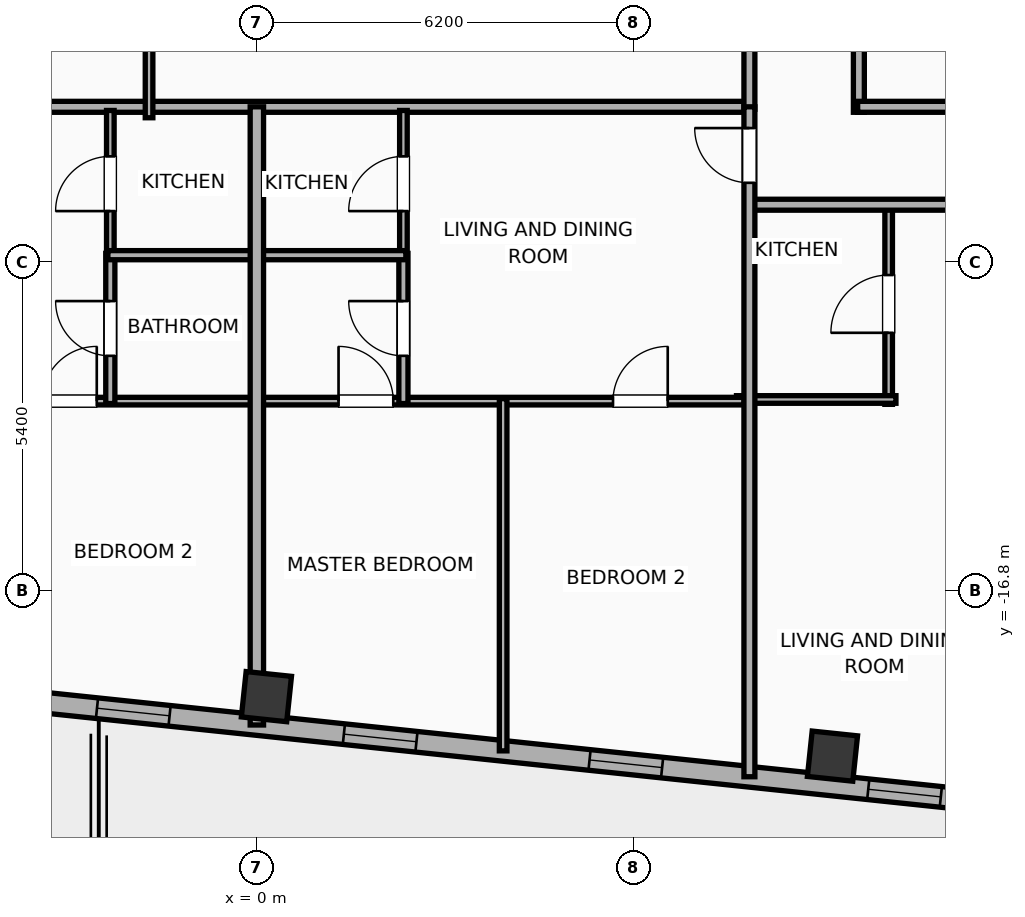
"""IFC4 building model, lengths in metres.
Left out: names, types, materials, properties, quantities, classifications, styles, units other than length and angle.
Written with IfcOpenShell. Run it as: python <this file> out.ifc"""

import sys

from ifc_helpers import new_model, si_unit, direction, frame, frame_2d, origin, origin_2d, place, context, subcontext, project, spatial, rectangle, hollow_rectangle, extrude, element, fill, save


model = new_model("IFC4")
c1 = context("Model", 3, precision=1e-05, world=origin(), true_north=direction((0.0, 1.0)))
c2 = subcontext(c1, "Body", "Model", "MODEL_VIEW")
j1 = project(units=[si_unit("LENGTHUNIT", "METRE"), si_unit("PLANEANGLEUNIT", "RADIAN")], contexts=[c1])
p1 = place(None, origin())
s1 = spatial("IfcSite", under=j1, at=p1, CompositionType="ELEMENT")
p2 = place(p1, origin())
s2 = spatial("IfcBuilding", under=s1, at=p2, CompositionType="ELEMENT")
p3 = place(p2, frame((0.0, 0.0, 291.2)))
s3 = spatial("IfcBuildingStorey", under=s2, at=p3, CompositionType="ELEMENT", Elevation=291.2)
for number, where, z_axis, x_axis in (
    (1, (0.157, -18.54, 0.0), (0.0, 0.0, 1.0), (0.995, -0.105, 0.0)),
    (2, (9.466, -19.518, 0.0), (0.0, 0.0, 1.0), (0.995, -0.105, 0.0)),
):
    element("IfcColumn", number, at=place(p3, frame(where, z_axis=z_axis, x_axis=x_axis)), inside=s3, PredefinedType="COLUMN", context=c2, shape_type="SweptSolid", body=[
        extrude(hollow_rectangle(XDim=0.75, YDim=0.75, WallThickness=0.025, at=origin_2d()), origin(), (0.0, 0.0, 1.0), 3.9),
    ])
p4 = place(p3, frame((18.708, -20.972, 0.0), z_axis=(0.0, 0.0, 1.0), x_axis=(-0.994521888554, 0.104528528102, 0.0)))
e3 = element("IfcWall", 3, at=p4, inside=s3, PredefinedType="ELEMENTEDWALL", context=c2, shape_type="SweptSolid", body=[
    extrude(rectangle(XDim=46.766, YDim=0.34, at=frame_2d((23.383, 0.0))), origin(), (0.0, 0.0, 1.0), 3.635),
])
p5 = place(p4, frame((23.733, 0.0, 0.65)))
e4 = element("IfcOpeningElement", 4, at=p5, cuts=e3, PredefinedType="OPENING", context=c2, shape_type="SweptSolid", body=[
    extrude(rectangle(XDim=2.6, YDim=2.45, at=frame_2d((1.3, 1.225))), frame((0.0, 0.18, 0.0), z_axis=(0.0, -1.0, 0.0), x_axis=(1.0, 0.0, 0.0)), (0.0, 0.0, 1.0), 0.36),
])
p6 = place(p4, frame((44.402, 0.0, 0.75)))
e5 = element("IfcOpeningElement", 5, at=p6, cuts=e3, PredefinedType="OPENING", context=c2, shape_type="SweptSolid", body=[
    extrude(rectangle(XDim=1.2, YDim=2.05, at=frame_2d((0.6, 1.025))), frame((0.0, 0.18, 0.0), z_axis=(0.0, -1.0, 0.0), x_axis=(1.0, 0.0, 0.0)), (0.0, 0.0, 1.0), 0.36),
])
p7 = place(p4, frame((39.54, 0.0, 0.75)))
e6 = element("IfcOpeningElement", 6, at=p7, cuts=e3, PredefinedType="OPENING", context=c2, shape_type="SweptSolid", body=[
    extrude(rectangle(XDim=1.2, YDim=2.05, at=frame_2d((0.6, 1.025))), frame((0.0, 0.18, 0.0), z_axis=(0.0, -1.0, 0.0), x_axis=(1.0, 0.0, 0.0)), (0.0, 0.0, 1.0), 0.36),
])
p8 = place(p4, frame((42.406, 0.0, 0.75)))
e7 = element("IfcOpeningElement", 7, at=p8, cuts=e3, PredefinedType="OPENING", context=c2, shape_type="SweptSolid", body=[
    extrude(rectangle(XDim=1.2, YDim=2.05, at=frame_2d((0.6, 1.025))), frame((0.0, 0.18, 0.0), z_axis=(0.0, -1.0, 0.0), x_axis=(1.0, 0.0, 0.0)), (0.0, 0.0, 1.0), 0.36),
])
p9 = place(p4, frame((34.933, 0.0, 0.75)))
e8 = element("IfcOpeningElement", 8, at=p9, cuts=e3, PredefinedType="OPENING", context=c2, shape_type="SweptSolid", body=[
    extrude(rectangle(XDim=1.2, YDim=2.05, at=frame_2d((0.6, 1.025))), frame((0.0, 0.18, 0.0), z_axis=(0.0, -1.0, 0.0), x_axis=(1.0, 0.0, 0.0)), (0.0, 0.0, 1.0), 0.36),
])
p10 = place(p4, frame((28.631, 0.0, 0.75)))
e9 = element("IfcOpeningElement", 9, at=p10, cuts=e3, PredefinedType="OPENING", context=c2, shape_type="SweptSolid", body=[
    extrude(rectangle(XDim=1.2, YDim=2.05, at=frame_2d((0.6, 1.025))), frame((0.0, 0.18, 0.0), z_axis=(0.0, -1.0, 0.0), x_axis=(1.0, 0.0, 0.0)), (0.0, 0.0, 1.0), 0.36),
])
p11 = place(p4, frame((30.896, 0.0, 0.75)))
e10 = element("IfcOpeningElement", 10, at=p11, cuts=e3, PredefinedType="OPENING", context=c2, shape_type="SweptSolid", body=[
    extrude(rectangle(XDim=1.2, YDim=2.05, at=frame_2d((0.6, 1.025))), frame((0.0, 0.18, 0.0), z_axis=(0.0, -1.0, 0.0), x_axis=(1.0, 0.0, 0.0)), (0.0, 0.0, 1.0), 0.36),
])
p12 = place(p4, frame((7.501, 0.0, 0.75)))
e11 = element("IfcOpeningElement", 11, at=p12, cuts=e3, PredefinedType="OPENING", context=c2, shape_type="SweptSolid", body=[
    extrude(rectangle(XDim=1.2, YDim=2.05, at=frame_2d((0.6, 1.025))), frame((0.0, 0.18, 0.0), z_axis=(0.0, -1.0, 0.0), x_axis=(1.0, 0.0, 0.0)), (0.0, 0.0, 1.0), 0.36),
])
p13 = place(p4, frame((4.159, 0.0, 0.75)))
e12 = element("IfcOpeningElement", 12, at=p13, cuts=e3, PredefinedType="OPENING", context=c2, shape_type="SweptSolid", body=[
    extrude(rectangle(XDim=1.2, YDim=2.05, at=frame_2d((0.6, 1.025))), frame((0.0, 0.18, 0.0), z_axis=(0.0, -1.0, 0.0), x_axis=(1.0, 0.0, 0.0)), (0.0, 0.0, 1.0), 0.36),
])
p14 = place(p4, frame((1.369, 0.0, 0.75)))
e13 = element("IfcOpeningElement", 13, at=p14, cuts=e3, PredefinedType="OPENING", context=c2, shape_type="SweptSolid", body=[
    extrude(rectangle(XDim=1.2, YDim=2.05, at=frame_2d((0.6, 1.025))), frame((0.0, 0.18, 0.0), z_axis=(0.0, -1.0, 0.0), x_axis=(1.0, 0.0, 0.0)), (0.0, 0.0, 1.0), 0.36),
])
p15 = place(p4, frame((20.254, 0.0, 0.75)))
e14 = element("IfcOpeningElement", 14, at=p15, cuts=e3, PredefinedType="OPENING", context=c2, shape_type="SweptSolid", body=[
    extrude(rectangle(XDim=1.2, YDim=2.05, at=frame_2d((0.6, 1.025))), frame((0.0, 0.18, 0.0), z_axis=(0.0, -1.0, 0.0), x_axis=(1.0, 0.0, 0.0)), (0.0, 0.0, 1.0), 0.36),
])
p16 = place(p4, frame((16.172, 0.0, 0.75)))
e15 = element("IfcOpeningElement", 15, at=p16, cuts=e3, PredefinedType="OPENING", context=c2, shape_type="SweptSolid", body=[
    extrude(rectangle(XDim=1.2, YDim=2.05, at=frame_2d((0.6, 1.025))), frame((0.0, 0.18, 0.0), z_axis=(0.0, -1.0, 0.0), x_axis=(1.0, 0.0, 0.0)), (0.0, 0.0, 1.0), 0.36),
])
p17 = place(p4, frame((12.11, 0.0, 0.75)))
e16 = element("IfcOpeningElement", 16, at=p17, cuts=e3, PredefinedType="OPENING", context=c2, shape_type="SweptSolid", body=[
    extrude(rectangle(XDim=1.2, YDim=2.05, at=frame_2d((0.6, 1.025))), frame((0.0, 0.18, 0.0), z_axis=(0.0, -1.0, 0.0), x_axis=(1.0, 0.0, 0.0)), (0.0, 0.0, 1.0), 0.36),
])
p18 = place(p3, frame((9.9, -8.93, 0.0), z_axis=(0.0, 0.0, 1.0), x_axis=(0.0, 1.0, 0.0)))
e17 = element("IfcWall", 17, at=p18, inside=s3, PredefinedType="PARTITIONING", context=c2, shape_type="SweptSolid", body=[
    extrude(rectangle(XDim=17.86, YDim=0.18, at=frame_2d((8.93, 0.0))), origin(), (0.0, 0.0, 1.0), 3.635),
])
p19 = place(p18, frame((7.487, 0.0, 0.0)))
e18 = element("IfcOpeningElement", 18, at=p19, cuts=e17, PredefinedType="OPENING", context=c2, shape_type="SweptSolid", body=[
    extrude(rectangle(XDim=1.1, YDim=2.05, at=frame_2d((0.55, 1.025))), frame((0.0, 0.1, 0.0), z_axis=(0.0, -1.0, 0.0), x_axis=(1.0, 0.0, 0.0)), (0.0, 0.0, 1.0), 0.2),
])
p20 = place(p3, frame((9.88, -8.84, 0.0), z_axis=(0.0, 0.0, 1.0), x_axis=(1.0, 0.0, 0.0)))
e19 = element("IfcWall", 19, at=p20, inside=s3, PredefinedType="PARTITIONING", context=c2, shape_type="SweptSolid", body=[
    extrude(rectangle(XDim=13.569, YDim=0.18, at=frame_2d((6.784, 0.0))), origin(), (0.0, 0.0, 1.0), 3.635),
])
p21 = place(p3, frame((-8.15, -8.84, 0.0), z_axis=(0.0, 0.0, 1.0), x_axis=(1.0, 0.0, 0.0)))
e20 = element("IfcWall", 20, at=p21, inside=s3, PredefinedType="PARTITIONING", context=c2, shape_type="SweptSolid", body=[
    extrude(rectangle(XDim=16.3, YDim=0.18, at=frame_2d((8.15, 0.0))), origin(), (0.0, 0.0, 1.0), 3.635),
])
p22 = place(p3, frame((8.1, -8.88, 0.0), z_axis=(0.0, 0.0, 1.0), x_axis=(0.0, 1.0, 0.0)))
e21 = element("IfcWall", 21, at=p22, inside=s3, PredefinedType="PARTITIONING", context=c2, shape_type="SweptSolid", body=[
    extrude(rectangle(XDim=17.76, YDim=0.18, at=frame_2d((8.88, 0.0))), origin(), (0.0, 0.0, 1.0), 3.635),
])
p23 = place(p3, frame((-1.773, -9.02, 0.0), z_axis=(0.0, 0.0, 1.0), x_axis=(0.0, 1.0, 0.0)))
e22 = element("IfcWall", 22, at=p23, inside=s3, PredefinedType="PARTITIONING", context=c2, shape_type="SweptSolid", body=[
    extrude(rectangle(XDim=17.99, YDim=0.125, at=frame_2d((8.995, 0.0))), origin(), (0.0, 0.0, 1.0), 3.635),
])
p24 = place(p23, frame((8.52, 0.0, 0.0)))
e23 = element("IfcOpeningElement", 23, at=p24, cuts=e22, PredefinedType="OPENING", context=c2, shape_type="SweptSolid", body=[
    extrude(rectangle(XDim=0.95, YDim=2.05, at=frame_2d((0.475, 1.025))), frame((0.0, 0.073, 0.0), z_axis=(0.0, -1.0, 0.0), x_axis=(1.0, 0.0, 0.0)), (0.0, 0.0, 1.0), 0.145),
])
p25 = place(p3, frame((10.39, -13.733, 0.0), z_axis=(0.0, 0.0, 1.0), x_axis=(0.0, 1.0, 0.0)))
e24 = element("IfcWall", 24, at=p25, inside=s3, PredefinedType="PARTITIONING", context=c2, shape_type="SweptSolid", body=[
    extrude(rectangle(XDim=3.303, YDim=0.125, at=frame_2d((1.651, 0.0))), origin(), (0.0, 0.0, 1.0), 3.635),
])
p26 = place(p25, frame((1.177, 0.0, 0.0)))
e25 = element("IfcOpeningElement", 25, at=p26, cuts=e24, PredefinedType="OPENING", context=c2, shape_type="SweptSolid", body=[
    extrude(rectangle(XDim=0.95, YDim=2.05, at=frame_2d((0.475, 1.025))), frame((0.0, 0.073, 0.0), z_axis=(0.0, -1.0, 0.0), x_axis=(1.0, 0.0, 0.0)), (0.0, 0.0, 1.0), 0.145),
])
p27 = place(p3, frame((7.887, -13.653, 0.0), z_axis=(0.0, 0.0, 1.0), x_axis=(1.0, 0.0, 0.0)))
e26 = element("IfcWall", 26, at=p27, inside=s3, PredefinedType="PARTITIONING", context=c2, shape_type="SweptSolid", body=[
    extrude(rectangle(XDim=2.623, YDim=0.125, at=frame_2d((1.311, 0.0))), origin(), (0.0, 0.0, 1.0), 3.635),
])
p28 = place(p3, frame((8.08, -10.45, 0.0), z_axis=(0.0, 0.0, 1.0), x_axis=(1.0, 0.0, 0.0)))
e27 = element("IfcWall", 27, at=p28, inside=s3, PredefinedType="PARTITIONING", context=c2, shape_type="SweptSolid", body=[
    extrude(rectangle(XDim=15.199, YDim=0.18, at=frame_2d((7.6, 0.0))), origin(), (0.0, 0.0, 1.0), 3.635),
])
p29 = place(p28, frame((3.39, 0.0, 0.0)))
e28 = element("IfcOpeningElement", 28, at=p29, cuts=e27, PredefinedType="OPENING", context=c2, shape_type="SweptSolid", body=[
    extrude(rectangle(XDim=1.15, YDim=2.05, at=frame_2d((0.575, 1.025))), frame((0.0, 0.1, 0.0), z_axis=(0.0, -1.0, 0.0), x_axis=(1.0, 0.0, 0.0)), (0.0, 0.0, 1.0), 0.2),
])
p30 = place(p28, frame((11.134, 0.0, 0.0)))
e29 = element("IfcOpeningElement", 29, at=p30, cuts=e27, PredefinedType="OPENING", context=c2, shape_type="SweptSolid", body=[
    extrude(rectangle(XDim=0.9, YDim=2.05, at=frame_2d((0.45, 1.025))), frame((0.0, 0.1, 0.0), z_axis=(0.0, -1.0, 0.0), x_axis=(1.0, 0.0, 0.0)), (0.0, 0.0, 1.0), 0.2),
])
p31 = place(p3, frame((-8.08, -13.68, 0.0), z_axis=(0.0, 0.0, 1.0), x_axis=(1.0, 0.0, 0.0)))
e30 = element("IfcWall", 30, at=p31, inside=s3, PredefinedType="PARTITIONING", context=c2, shape_type="SweptSolid", body=[
    extrude(rectangle(XDim=8.06, YDim=0.125, at=frame_2d((4.03, 0.0))), origin(), (0.0, 0.0, 1.0), 3.635),
])
p32 = place(p31, frame((1.323, 0.0, 0.0)))
e31 = element("IfcOpeningElement", 31, at=p32, cuts=e30, PredefinedType="OPENING", context=c2, shape_type="SweptSolid", body=[
    extrude(rectangle(XDim=0.9, YDim=2.05, at=frame_2d((0.45, 1.025))), frame((0.0, 0.073, 0.0), z_axis=(0.0, -1.0, 0.0), x_axis=(1.0, 0.0, 0.0)), (0.0, 0.0, 1.0), 0.145),
])
p33 = place(p31, frame((4.547, 0.0, 0.0)))
e32 = element("IfcOpeningElement", 32, at=p33, cuts=e30, PredefinedType="OPENING", context=c2, shape_type="SweptSolid", body=[
    extrude(rectangle(XDim=0.9, YDim=2.05, at=frame_2d((0.45, 1.025))), frame((0.0, 0.073, 0.0), z_axis=(0.0, -1.0, 0.0), x_axis=(1.0, 0.0, 0.0)), (0.0, 0.0, 1.0), 0.145),
])
p34 = place(p3, frame((-2.41, -11.31, 0.0), z_axis=(0.0, 0.0, 1.0), x_axis=(0.0, 1.0, 0.0)))
e33 = element("IfcWall", 33, at=p34, inside=s3, PredefinedType="PARTITIONING", context=c2, shape_type="SweptSolid", body=[
    extrude(rectangle(XDim=2.41, YDim=0.125, at=frame_2d((1.205, 0.0))), origin(), (0.0, 0.0, 1.0), 3.635),
])
p35 = place(p34, frame((0.755, 0.0, 0.0)))
e34 = element("IfcOpeningElement", 34, at=p35, cuts=e33, PredefinedType="OPENING", context=c2, shape_type="SweptSolid", body=[
    extrude(rectangle(XDim=0.9, YDim=2.05, at=frame_2d((0.45, 1.025))), frame((0.0, 0.073, 0.0), z_axis=(0.0, -1.0, 0.0), x_axis=(1.0, 0.0, 0.0)), (0.0, 0.0, 1.0), 0.145),
])
p36 = place(p3, frame((-2.41, -13.72, 0.0), z_axis=(0.0, 0.0, 1.0), x_axis=(0.0, 1.0, 0.0)))
e35 = element("IfcWall", 35, at=p36, inside=s3, PredefinedType="PLUMBINGWALL", context=c2, shape_type="SweptSolid", body=[
    extrude(rectangle(XDim=2.47, YDim=0.15, at=frame_2d((1.235, 0.0))), origin(), (0.0, 0.0, 1.0), 3.635),
])
p37 = place(p36, frame((0.785, 0.0, 0.0)))
e36 = element("IfcOpeningElement", 36, at=p37, cuts=e35, PredefinedType="OPENING", context=c2, shape_type="SweptSolid", body=[
    extrude(rectangle(XDim=0.9, YDim=2.05, at=frame_2d((0.45, 1.025))), frame((0.0, 0.085, 0.0), z_axis=(0.0, -1.0, 0.0), x_axis=(1.0, 0.0, 0.0)), (0.0, 0.0, 1.0), 0.17),
])
p38 = place(p3, frame((-2.45, -11.28, 0.0), z_axis=(0.0, 0.0, 1.0), x_axis=(1.0, 0.0, 0.0)))
e37 = element("IfcWall", 37, at=p38, inside=s3, PredefinedType="PLUMBINGWALL", context=c2, shape_type="SweptSolid", body=[
    extrude(rectangle(XDim=2.43, YDim=0.15, at=frame_2d((1.215, 0.0))), origin(), (0.0, 0.0, 1.0), 3.635),
])
p39 = place(p3, frame((0.02, -13.68, 0.0), z_axis=(0.0, 0.0, 1.0), x_axis=(1.0, 0.0, 0.0)))
e38 = element("IfcWall", 38, at=p39, inside=s3, PredefinedType="PARTITIONING", context=c2, shape_type="SweptSolid", body=[
    extrude(rectangle(XDim=7.992, YDim=0.125, at=frame_2d((3.996, 0.0))), origin(), (0.0, 0.0, 1.0), 3.635),
])
p40 = place(p39, frame((1.323, 0.0, 0.0)))
e39 = element("IfcOpeningElement", 39, at=p40, cuts=e38, PredefinedType="OPENING", context=c2, shape_type="SweptSolid", body=[
    extrude(rectangle(XDim=0.9, YDim=2.05, at=frame_2d((0.45, 1.025))), frame((0.0, 0.073, 0.0), z_axis=(0.0, -1.0, 0.0), x_axis=(1.0, 0.0, 0.0)), (0.0, 0.0, 1.0), 0.145),
])
p41 = place(p39, frame((5.837, 0.0, 0.0)))
e40 = element("IfcOpeningElement", 40, at=p41, cuts=e38, PredefinedType="OPENING", context=c2, shape_type="SweptSolid", body=[
    extrude(rectangle(XDim=0.9, YDim=2.05, at=frame_2d((0.45, 1.025))), frame((0.0, 0.073, 0.0), z_axis=(0.0, -1.0, 0.0), x_axis=(1.0, 0.0, 0.0)), (0.0, 0.0, 1.0), 0.145),
])
p42 = place(p3, frame((2.41, -11.31, 0.0), z_axis=(0.0, 0.0, 1.0), x_axis=(0.0, 1.0, 0.0)))
e41 = element("IfcWall", 41, at=p42, inside=s3, PredefinedType="PARTITIONING", context=c2, shape_type="SweptSolid", body=[
    extrude(rectangle(XDim=2.41, YDim=0.125, at=frame_2d((1.205, 0.0))), origin(), (0.0, 0.0, 1.0), 3.635),
])
p43 = place(p42, frame((0.755, 0.0, 0.0)))
e42 = element("IfcOpeningElement", 42, at=p43, cuts=e41, PredefinedType="OPENING", context=c2, shape_type="SweptSolid", body=[
    extrude(rectangle(XDim=0.9, YDim=2.05, at=frame_2d((0.45, 1.025))), frame((0.0, 0.073, 0.0), z_axis=(0.0, -1.0, 0.0), x_axis=(1.0, 0.0, 0.0)), (0.0, 0.0, 1.0), 0.145),
])
p44 = place(p3, frame((2.41, -13.72, 0.0), z_axis=(0.0, 0.0, 1.0), x_axis=(0.0, 1.0, 0.0)))
e43 = element("IfcWall", 43, at=p44, inside=s3, PredefinedType="PLUMBINGWALL", context=c2, shape_type="SweptSolid", body=[
    extrude(rectangle(XDim=2.47, YDim=0.15, at=frame_2d((1.235, 0.0))), origin(), (0.0, 0.0, 1.0), 3.075),
])
p45 = place(p44, frame((0.785, 0.0, 0.0)))
e44 = element("IfcOpeningElement", 44, at=p45, cuts=e43, PredefinedType="OPENING", context=c2, shape_type="SweptSolid", body=[
    extrude(rectangle(XDim=0.9, YDim=2.05, at=frame_2d((0.45, 1.025))), frame((0.0, 0.085, 0.0), z_axis=(0.0, -1.0, 0.0), x_axis=(1.0, 0.0, 0.0)), (0.0, 0.0, 1.0), 0.17),
])
p46 = place(p3, frame((0.02, -11.28, 0.0), z_axis=(0.0, 0.0, 1.0), x_axis=(1.0, 0.0, 0.0)))
e45 = element("IfcWall", 45, at=p46, inside=s3, PredefinedType="PLUMBINGWALL", context=c2, shape_type="SweptSolid", body=[
    extrude(rectangle(XDim=2.43, YDim=0.15, at=frame_2d((1.215, 0.0))), origin(), (0.0, 0.0, 1.0), 3.635),
])
p47 = place(p3, frame((4.05, -19.432, 0.0), z_axis=(0.0, 0.0, 1.0), x_axis=(0.0, 1.0, 0.0)))
e46 = element("IfcWall", 46, at=p47, inside=s3, PredefinedType="PARTITIONING", context=c2, shape_type="SweptSolid", body=[
    extrude(rectangle(XDim=5.792, YDim=0.125, at=frame_2d((2.896, 0.0))), origin(), (0.0, 0.0, 1.0), 3.635),
])
p48 = place(p3, frame((8.1, -19.857, 0.0), z_axis=(0.0, 0.0, 1.0), x_axis=(0.0, 1.0, 0.0)))
e47 = element("IfcWall", 47, at=p48, inside=s3, PredefinedType="PARTITIONING", context=c2, shape_type="SweptSolid", body=[
    extrude(rectangle(XDim=11.017, YDim=0.18, at=frame_2d((5.509, 0.0))), origin(), (0.0, 0.0, 1.0), 3.635),
])
p49 = place(p48, frame((9.767, 0.0, 0.0)))
e48 = element("IfcOpeningElement", 48, at=p49, cuts=e47, PredefinedType="OPENING", context=c2, shape_type="SweptSolid", body=[
    extrude(rectangle(XDim=0.9, YDim=2.05, at=frame_2d((0.45, 1.025))), frame((0.0, 0.1, 0.0), z_axis=(0.0, -1.0, 0.0), x_axis=(1.0, 0.0, 0.0)), (0.0, 0.0, 1.0), 0.2),
])
p50 = place(p3, frame((0.0, -19.006, 0.0), z_axis=(0.0, 0.0, 1.0), x_axis=(0.0, 1.0, 0.0)))
e49 = element("IfcWall", 49, at=p50, inside=s3, PredefinedType="PARTITIONING", context=c2, shape_type="SweptSolid", body=[
    extrude(rectangle(XDim=10.166, YDim=0.22, at=frame_2d((5.083, 0.0))), origin(), (0.0, 0.0, 1.0), 3.635),
])
p51 = place(p12, origin())
e50 = element("IfcWindow", 50, at=p51, inside=s3, PartitioningType="SINGLE_PANEL", PredefinedType="WINDOW", context=c2, shape_type="SweptSolid", body=[
    extrude(rectangle(XDim=1.2, YDim=2.05, at=frame_2d((0.6, 1.025))), frame((0.0, 0.03, 0.0), z_axis=(0.0, -1.0, 0.0), x_axis=(1.0, 0.0, 0.0)), (0.0, 0.0, 1.0), 0.06),
])
fill(e11, e50)
p52 = place(p15, origin())
e51 = element("IfcWindow", 51, at=p52, inside=s3, PartitioningType="SINGLE_PANEL", PredefinedType="WINDOW", context=c2, shape_type="SweptSolid", body=[
    extrude(rectangle(XDim=1.2, YDim=2.05, at=frame_2d((0.6, 1.025))), frame((0.0, 0.03, 0.0), z_axis=(0.0, -1.0, 0.0), x_axis=(1.0, 0.0, 0.0)), (0.0, 0.0, 1.0), 0.06),
])
fill(e14, e51)
p53 = place(p16, origin())
e52 = element("IfcWindow", 52, at=p53, inside=s3, PartitioningType="SINGLE_PANEL", PredefinedType="WINDOW", context=c2, shape_type="SweptSolid", body=[
    extrude(rectangle(XDim=1.2, YDim=2.05, at=frame_2d((0.6, 1.025))), frame((0.0, 0.03, 0.0), z_axis=(0.0, -1.0, 0.0), x_axis=(1.0, 0.0, 0.0)), (0.0, 0.0, 1.0), 0.06),
])
fill(e15, e52)
p54 = place(p17, origin())
e53 = element("IfcWindow", 53, at=p54, inside=s3, PartitioningType="SINGLE_PANEL", PredefinedType="WINDOW", context=c2, shape_type="SweptSolid", body=[
    extrude(rectangle(XDim=1.2, YDim=2.05, at=frame_2d((0.6, 1.025))), frame((0.0, 0.03, 0.0), z_axis=(0.0, -1.0, 0.0), x_axis=(1.0, 0.0, 0.0)), (0.0, 0.0, 1.0), 0.06),
])
fill(e16, e53)
p55 = place(p26, origin())
e54 = element("IfcDoor", 54, at=p55, inside=s3, OperationType="SINGLE_SWING_LEFT", PredefinedType="DOOR", context=c2, shape_type="SweptSolid", body=[
    extrude(rectangle(XDim=0.95, YDim=2.05, at=frame_2d((0.475, 1.025))), frame((0.0, 0.025, 0.0), z_axis=(0.0, -1.0, 0.0), x_axis=(1.0, 0.0, 0.0)), (0.0, 0.0, 1.0), 0.05),
])
fill(e25, e54)
p56 = place(p33, origin())
e55 = element("IfcDoor", 55, at=p56, inside=s3, OperationType="SINGLE_SWING_RIGHT", PredefinedType="DOOR", context=c2, shape_type="SweptSolid", body=[
    extrude(rectangle(XDim=0.9, YDim=2.05, at=frame_2d((0.45, 1.025))), frame((0.0, 0.025, 0.0), z_axis=(0.0, -1.0, 0.0), x_axis=(1.0, 0.0, 0.0)), (0.0, 0.0, 1.0), 0.05),
])
fill(e32, e55)
p57 = place(p35, origin())
e56 = element("IfcDoor", 56, at=p57, inside=s3, OperationType="SINGLE_SWING_LEFT", PredefinedType="DOOR", context=c2, shape_type="SweptSolid", body=[
    extrude(rectangle(XDim=0.9, YDim=2.05, at=frame_2d((0.45, 1.025))), frame((0.0, 0.025, 0.0), z_axis=(0.0, -1.0, 0.0), x_axis=(1.0, 0.0, 0.0)), (0.0, 0.0, 1.0), 0.05),
])
fill(e34, e56)
p58 = place(p37, origin())
e57 = element("IfcDoor", 57, at=p58, inside=s3, OperationType="SINGLE_SWING_RIGHT", PredefinedType="DOOR", context=c2, shape_type="SweptSolid", body=[
    extrude(rectangle(XDim=0.9, YDim=2.05, at=frame_2d((0.45, 1.025))), frame((0.0, 0.025, 0.0), z_axis=(0.0, -1.0, 0.0), x_axis=(1.0, 0.0, 0.0)), (0.0, 0.0, 1.0), 0.05),
])
fill(e36, e57)
p59 = place(p40, origin())
e58 = element("IfcDoor", 58, at=p59, inside=s3, OperationType="SINGLE_SWING_LEFT", PredefinedType="DOOR", context=c2, shape_type="SweptSolid", body=[
    extrude(rectangle(XDim=0.9, YDim=2.05, at=frame_2d((0.45, 1.025))), frame((0.0, 0.025, 0.0), z_axis=(0.0, -1.0, 0.0), x_axis=(1.0, 0.0, 0.0)), (0.0, 0.0, 1.0), 0.05),
])
fill(e39, e58)
p60 = place(p41, origin())
e59 = element("IfcDoor", 59, at=p60, inside=s3, OperationType="SINGLE_SWING_RIGHT", PredefinedType="DOOR", context=c2, shape_type="SweptSolid", body=[
    extrude(rectangle(XDim=0.9, YDim=2.05, at=frame_2d((0.45, 1.025))), frame((0.0, 0.025, 0.0), z_axis=(0.0, -1.0, 0.0), x_axis=(1.0, 0.0, 0.0)), (0.0, 0.0, 1.0), 0.05),
])
fill(e40, e59)
p61 = place(p43, origin())
e60 = element("IfcDoor", 60, at=p61, inside=s3, OperationType="SINGLE_SWING_LEFT", PredefinedType="DOOR", context=c2, shape_type="SweptSolid", body=[
    extrude(rectangle(XDim=0.9, YDim=2.05, at=frame_2d((0.45, 1.025))), frame((0.0, 0.025, 0.0), z_axis=(0.0, -1.0, 0.0), x_axis=(1.0, 0.0, 0.0)), (0.0, 0.0, 1.0), 0.05),
])
fill(e42, e60)
p62 = place(p45, origin())
e61 = element("IfcDoor", 61, at=p62, inside=s3, OperationType="SINGLE_SWING_RIGHT", PredefinedType="DOOR", context=c2, shape_type="SweptSolid", body=[
    extrude(rectangle(XDim=0.9, YDim=2.05, at=frame_2d((0.45, 1.025))), frame((0.0, 0.025, 0.0), z_axis=(0.0, -1.0, 0.0), x_axis=(1.0, 0.0, 0.0)), (0.0, 0.0, 1.0), 0.05),
])
fill(e44, e61)
p63 = place(p49, origin())
e62 = element("IfcDoor", 62, at=p63, inside=s3, OperationType="SINGLE_SWING_RIGHT", PredefinedType="DOOR", context=c2, shape_type="SweptSolid", body=[
    extrude(rectangle(XDim=0.9, YDim=2.05, at=frame_2d((0.45, 1.025))), frame((0.0, 0.025, 0.0), z_axis=(0.0, -1.0, 0.0), x_axis=(1.0, 0.0, 0.0)), (0.0, 0.0, 1.0), 0.05),
])
fill(e48, e62)
save(model, sys.argv[1])
